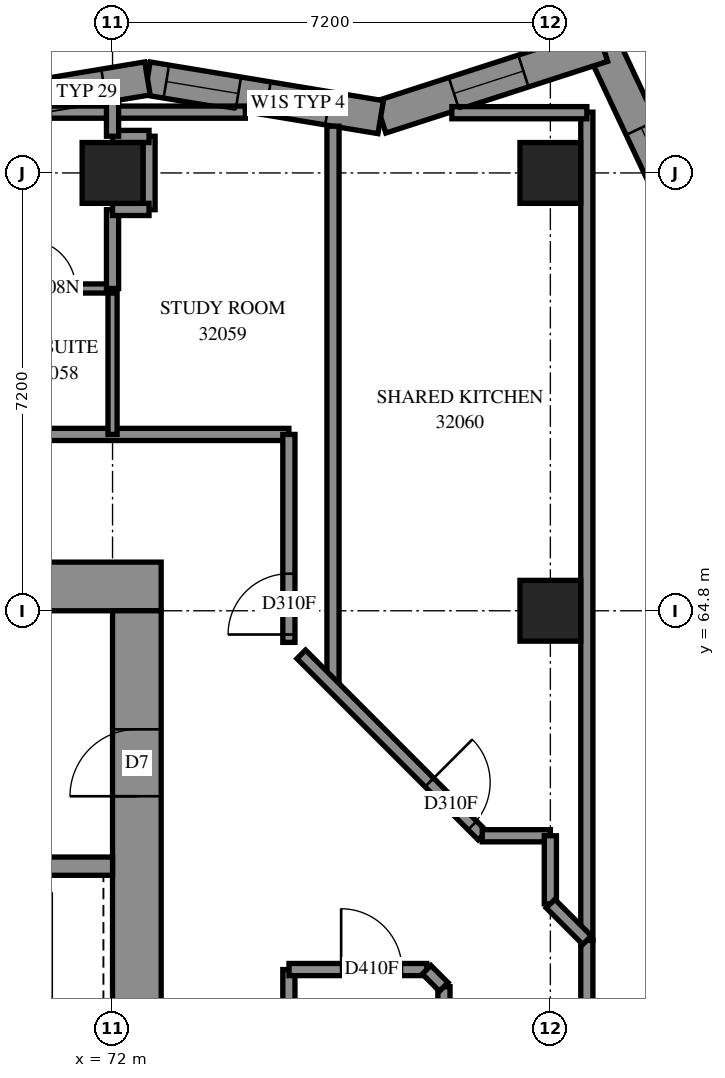
"""IFC4 building model, lengths in metres.
Left out: names, types, materials, properties, quantities, classifications, styles, units other than length and angle.
Written with IfcOpenShell. Run it as: python <this file> out.ifc"""

import sys

from ifc_helpers import new_model, si_unit, direction, frame, frame_2d, origin, origin_2d, place, context, subcontext, project, spatial, polyline, rectangle, outline, extrude, element, fill, save


model = new_model("IFC4")
c1 = context("Model", 3, precision=1e-05, world=origin(), true_north=direction((0.0, 1.0)))
c2 = subcontext(c1, "Body", "Model", "MODEL_VIEW")
j1 = project(units=[si_unit("LENGTHUNIT", "METRE"), si_unit("PLANEANGLEUNIT", "RADIAN")], contexts=[c1])
p1 = place(None, origin())
s1 = spatial("IfcSite", under=j1, at=p1, CompositionType="ELEMENT")
p2 = place(p1, origin())
s2 = spatial("IfcBuilding", under=s1, at=p2, CompositionType="ELEMENT")
p3 = place(p2, frame((0.0, 0.0, 118.6)))
s3 = spatial("IfcBuildingStorey", under=s2, at=p3, CompositionType="ELEMENT", Elevation=118.6)
for number, where, z_axis, x_axis in (
    (1, (72.0, 72.0, 0.0), (0.0, 0.0, 1.0), (1.0, 0.0, 0.0)),
    (2, (79.2, 64.8, 0.0), (0.0, 0.0, 1.0), (1.0, 0.0, 0.0)),
    (3, (79.2, 72.0, 0.0), (0.0, 0.0, 1.0), (1.0, 0.0, 0.0)),
):
    element("IfcColumn", number, at=place(p3, frame(where, z_axis=z_axis, x_axis=x_axis)), inside=s3, PredefinedType="COLUMN", context=c2, shape_type="SweptSolid", body=[
        extrude(rectangle(XDim=1.0, YDim=1.0, at=origin_2d()), origin(), (0.0, 0.0, 1.0), 3.1),
    ])
p4 = place(p3, frame((56.8, 65.2, -0.3), z_axis=(0.0, 0.0, 1.0), x_axis=(1.0, 0.0, 0.0)))
e4 = element("IfcWall", 4, at=p4, inside=s3, PredefinedType="SHEAR", context=c2, shape_type="SweptSolid", body=[
    extrude(rectangle(XDim=16.0, YDim=0.8, at=frame_2d((8.0, 0.0))), origin(), (0.0, 0.0, 1.0), 2.7),
])
p5 = place(p4, frame((10.8, 0.0, 0.3)))
e5 = element("IfcOpeningElement", 5, at=p5, cuts=e4, PredefinedType="OPENING", context=c2, shape_type="SweptSolid", body=[
    extrude(rectangle(XDim=0.8, YDim=2.1, at=frame_2d((0.4, 1.05))), frame((0.0, 0.41, 0.0), z_axis=(0.0, -1.0, 0.0), x_axis=(1.0, 0.0, 0.0)), (0.0, 0.0, 1.0), 0.82),
])
p6 = place(p3, frame((72.4, 50.4, -0.3), z_axis=(0.0, 0.0, 1.0), x_axis=(0.0, 1.0, 0.0)))
e6 = element("IfcWall", 6, at=p6, inside=s3, PredefinedType="SHEAR", context=c2, shape_type="SweptSolid", body=[
    extrude(rectangle(XDim=14.4, YDim=0.8, at=frame_2d((7.2, 0.0))), origin(), (0.0, 0.0, 1.0), 2.7),
])
p7 = place(p6, frame((4.55, 0.0, 0.3)))
e7 = element("IfcOpeningElement", 7, at=p7, cuts=e6, PredefinedType="OPENING", context=c2, shape_type="SweptSolid", body=[
    extrude(rectangle(XDim=1.1, YDim=2.1, at=frame_2d((0.55, 1.05))), frame((0.0, 0.41, 0.0), z_axis=(0.0, -1.0, 0.0), x_axis=(1.0, 0.0, 0.0)), (0.0, 0.0, 1.0), 0.82),
])
p8 = place(p6, frame((11.35, 0.0, 0.3)))
e8 = element("IfcOpeningElement", 8, at=p8, cuts=e6, PredefinedType="OPENING", context=c2, shape_type="SweptSolid", body=[
    extrude(rectangle(XDim=1.1, YDim=2.1, at=frame_2d((0.55, 1.05))), frame((0.0, 0.41, 0.0), z_axis=(0.0, -1.0, 0.0), x_axis=(1.0, 0.0, 0.0)), (0.0, 0.0, 1.0), 0.82),
])
p9 = place(p3, frame((64.8, 60.6, 0.0), z_axis=(0.0, 0.0, 1.0), x_axis=(1.0, 0.0, 0.0)))
e9 = element("IfcWall", 9, at=p9, inside=s3, PredefinedType="SOLIDWALL", context=c2, shape_type="SweptSolid", body=[
    extrude(rectangle(XDim=7.2, YDim=0.3, at=frame_2d((3.6, 0.0))), origin(), (0.0, 0.0, 1.0), 3.1),
])
p10 = place(p3, frame((76.372, 49.373, -0.3), z_axis=(0.0, 0.0, 1.0), x_axis=(0.7071067812, 0.7071067812, 0.0)))
e10 = element("IfcWall", 10, at=p10, inside=s3, PredefinedType="SHEAR", context=c2, shape_type="SweptSolid", body=[
    extrude(rectangle(XDim=14.4, YDim=0.8, at=frame_2d((7.2, 0.0))), origin(), (0.0, 0.0, 1.0), 2.7),
])
p11 = place(p10, frame((4.55, 0.0, 0.3)))
e11 = element("IfcOpeningElement", 11, at=p11, cuts=e10, PredefinedType="OPENING", context=c2, shape_type="SweptSolid", body=[
    extrude(rectangle(XDim=1.1, YDim=2.1, at=frame_2d((0.55, 1.05))), frame((0.0, 0.41, 0.0), z_axis=(0.0, -1.0, 0.0), x_axis=(1.0, 0.0, 0.0)), (0.0, 0.0, 1.0), 0.82),
])
p12 = place(p10, frame((11.35, 0.0, 0.3)))
e12 = element("IfcOpeningElement", 12, at=p12, cuts=e10, PredefinedType="OPENING", context=c2, shape_type="SweptSolid", body=[
    extrude(rectangle(XDim=1.1, YDim=2.1, at=frame_2d((0.55, 1.05))), frame((0.0, 0.41, 0.0), z_axis=(0.0, -1.0, 0.0), x_axis=(1.0, 0.0, 0.0)), (0.0, 0.0, 1.0), 0.82),
])
p13 = place(p3, frame((81.531, 70.964, 0.0), z_axis=(0.0, 0.0, 1.0), x_axis=(-0.425664885, 0.9048808793, 0.0)))
e13 = element("IfcWall", 13, at=p13, inside=s3, PredefinedType="SOLIDWALL", context=c2, shape_type="SweptSolid", body=[
    extrude(outline(polyline([(0.074, -0.275), (3.704, -0.275), (3.22, 0.275), (-0.074, 0.275), (0.074, -0.275)])), origin(), (0.0, 0.0, 1.0), 3.1),
])
p14 = place(p13, frame((0.765, 0.0, 0.5)))
e14 = element("IfcOpeningElement", 14, at=p14, cuts=e13, PredefinedType="OPENING", context=c2, shape_type="SweptSolid", body=[
    extrude(rectangle(XDim=1.2, YDim=2.45, at=frame_2d((0.6, 1.225))), frame((0.0, 0.285, 0.0), z_axis=(0.0, -1.0, 0.0), x_axis=(1.0, 0.0, 0.0)), (0.0, 0.0, 1.0), 0.57),
])
p15 = place(p3, frame((80.058, 74.097, 0.0), z_axis=(0.0, 0.0, 1.0), x_axis=(-0.9515336755, -0.307544573, 0.0)))
e15 = element("IfcWall", 15, at=p15, inside=s3, PredefinedType="SOLIDWALL", context=c2, shape_type="SweptSolid", body=[
    extrude(outline(polyline([(-0.242, -0.275), (3.767, -0.275), (3.901, 0.275), (0.242, 0.275), (-0.242, -0.275)])), origin(), (0.0, 0.0, 1.0), 3.1),
])
p16 = place(p15, frame((1.368, 0.0, 0.5)))
e16 = element("IfcOpeningElement", 16, at=p16, cuts=e15, PredefinedType="OPENING", context=c2, shape_type="SweptSolid", body=[
    extrude(rectangle(XDim=1.2, YDim=2.45, at=frame_2d((0.6, 1.225))), frame((0.0, 0.285, 0.0), z_axis=(0.0, -1.0, 0.0), x_axis=(1.0, 0.0, 0.0)), (0.0, 0.0, 1.0), 0.57),
])
p17 = place(p3, frame((76.41, 72.918, 0.0), z_axis=(0.0, 0.0, 1.0), x_axis=(-0.9865139149, 0.1636774136, 0.0)))
e17 = element("IfcWall", 17, at=p17, inside=s3, PredefinedType="SOLIDWALL", context=c2, shape_type="SweptSolid", body=[
    extrude(outline(polyline([(0.067, -0.275), (3.934, -0.275), (3.843, 0.275), (-0.067, 0.275), (0.067, -0.275)])), origin(), (0.0, 0.0, 1.0), 3.1),
])
p18 = place(p17, frame((0.879, 0.0, 0.45)))
e18 = element("IfcOpeningElement", 18, at=p18, cuts=e17, PredefinedType="OPENING", context=c2, shape_type="SweptSolid", body=[
    extrude(rectangle(XDim=1.0, YDim=2.5, at=frame_2d((0.5, 1.25))), frame((0.0, 0.285, 0.0), z_axis=(0.0, -1.0, 0.0), x_axis=(1.0, 0.0, 0.0)), (0.0, 0.0, 1.0), 0.57),
])
p19 = place(p17, frame((2.374, 0.0, 0.5)))
e19 = element("IfcOpeningElement", 19, at=p19, cuts=e17, PredefinedType="OPENING", context=c2, shape_type="SweptSolid", body=[
    extrude(rectangle(XDim=1.2, YDim=2.45, at=frame_2d((0.6, 1.225))), frame((0.0, 0.285, 0.0), z_axis=(0.0, -1.0, 0.0), x_axis=(1.0, 0.0, 0.0)), (0.0, 0.0, 1.0), 0.57),
])
p20 = place(p3, frame((72.574, 73.554, 0.0), z_axis=(0.0, 0.0, 1.0), x_axis=(-0.9865110911, -0.1636944324, 0.0)))
e20 = element("IfcWall", 20, at=p20, inside=s3, PredefinedType="SOLIDWALL", context=c2, shape_type="SweptSolid", body=[
    extrude(outline(polyline([(-0.046, -0.275), (3.821, -0.275), (3.913, 0.275), (0.046, 0.275), (-0.046, -0.275)])), origin(), (0.0, 0.0, 1.0), 3.1),
])
p21 = place(p20, frame((0.724, 0.0, 0.5)))
e21 = element("IfcOpeningElement", 21, at=p21, cuts=e20, PredefinedType="OPENING", context=c2, shape_type="SweptSolid", body=[
    extrude(rectangle(XDim=1.3, YDim=2.45, at=frame_2d((0.65, 1.225))), frame((0.0, 0.285, 0.0), z_axis=(0.0, -1.0, 0.0), x_axis=(1.0, 0.0, 0.0)), (0.0, 0.0, 1.0), 0.57),
])
p22 = place(p20, frame((2.224, 0.0, 0.5)))
e22 = element("IfcOpeningElement", 22, at=p22, cuts=e20, PredefinedType="OPENING", context=c2, shape_type="SweptSolid", body=[
    extrude(rectangle(XDim=1.3, YDim=2.45, at=frame_2d((0.65, 1.225))), frame((0.0, 0.285, 0.0), z_axis=(0.0, -1.0, 0.0), x_axis=(1.0, 0.0, 0.0)), (0.0, 0.0, 1.0), 0.57),
])
p23 = place(p3, frame((54.7, 67.7, 0.0), z_axis=(0.0, 0.0, 1.0), x_axis=(1.0, 0.0, 0.0)))
e23 = element("IfcWall", 23, at=p23, inside=s3, PredefinedType="PARTITIONING", context=c2, shape_type="SweptSolid", body=[
    extrude(rectangle(XDim=20.2, YDim=0.2, at=frame_2d((10.1, 0.0))), origin(), (0.0, 0.0, 1.0), 3.1),
])
p24 = place(p23, frame((5.2, 0.0, 0.0)))
e24 = element("IfcOpeningElement", 24, at=p24, cuts=e23, PredefinedType="OPENING", context=c2, shape_type="SweptSolid", body=[
    extrude(rectangle(XDim=0.9, YDim=2.1, at=frame_2d((0.45, 1.05))), frame((0.0, 0.11, 0.0), z_axis=(0.0, -1.0, 0.0), x_axis=(1.0, 0.0, 0.0)), (0.0, 0.0, 1.0), 0.22),
])
p25 = place(p23, frame((8.838, 0.0, 0.0)))
e25 = element("IfcOpeningElement", 25, at=p25, cuts=e23, PredefinedType="OPENING", context=c2, shape_type="SweptSolid", body=[
    extrude(rectangle(XDim=1.0, YDim=2.1, at=frame_2d((0.5, 1.05))), frame((0.0, 0.11, 0.0), z_axis=(0.0, -1.0, 0.0), x_axis=(1.0, 0.0, 0.0)), (0.0, 0.0, 1.0), 0.22),
])
p26 = place(p23, frame((14.1, 0.0, 0.0)))
e26 = element("IfcOpeningElement", 26, at=p26, cuts=e23, PredefinedType="OPENING", context=c2, shape_type="SweptSolid", body=[
    extrude(rectangle(XDim=0.9, YDim=2.1, at=frame_2d((0.45, 1.05))), frame((0.0, 0.11, 0.0), z_axis=(0.0, -1.0, 0.0), x_axis=(1.0, 0.0, 0.0)), (0.0, 0.0, 1.0), 0.22),
])
p27 = place(p3, frame((79.8, 59.38, 0.0), z_axis=(0.0, 0.0, 1.0), x_axis=(0.0, 1.0, 0.0)))
e27 = element("IfcWall", 27, at=p27, inside=s3, PredefinedType="PARTITIONING", context=c2, shape_type="SweptSolid", body=[
    extrude(rectangle(XDim=13.62, YDim=0.2, at=frame_2d((6.81, 0.0))), origin(), (0.0, 0.0, 1.0), 3.1),
])
p28 = place(p3, frame((75.625, 63.562, 0.0), z_axis=(0.0, 0.0, 1.0), x_axis=(0.0, 1.0, 0.0)))
e28 = element("IfcWall", 28, at=p28, inside=s3, PredefinedType="PARTITIONING", context=c2, shape_type="SweptSolid", body=[
    extrude(rectangle(XDim=9.208, YDim=0.2, at=frame_2d((4.604, 0.0))), origin(), (0.0, 0.0, 1.0), 3.1),
])
p29 = place(p3, frame((74.9, 53.9, 0.0), z_axis=(0.0, 0.0, 1.0), x_axis=(0.0, 1.0, 0.0)))
e29 = element("IfcWall", 29, at=p29, inside=s3, PredefinedType="PARTITIONING", context=c2, shape_type="SweptSolid", body=[
    extrude(rectangle(XDim=5.0, YDim=0.2, at=frame_2d((2.5, 0.0))), origin(), (0.0, 0.0, 1.0), 3.1),
])
p30 = place(p3, frame((75.103, 64.083, 0.0), z_axis=(0.0, 0.0, 1.0), x_axis=(0.7071067812, -0.7071067812, 0.0)))
e30 = element("IfcWall", 30, at=p30, inside=s3, PredefinedType="PARTITIONING", context=c2, shape_type="SweptSolid", body=[
    extrude(rectangle(XDim=4.214, YDim=0.2, at=frame_2d((2.107, 0.0))), origin(), (0.0, 0.0, 1.0), 3.1),
])
p31 = place(p30, frame((2.979, 0.0, 0.0)))
e31 = element("IfcOpeningElement", 31, at=p31, cuts=e30, PredefinedType="OPENING", context=c2, shape_type="SweptSolid", body=[
    extrude(rectangle(XDim=1.0, YDim=2.1, at=frame_2d((0.5, 1.05))), frame((0.0, 0.11, 0.0), z_axis=(0.0, -1.0, 0.0), x_axis=(1.0, 0.0, 0.0)), (0.0, 0.0, 1.0), 0.22),
])
p32 = place(p3, frame((74.9, 64.28, 0.0), z_axis=(0.0, 0.0, 1.0), x_axis=(0.0, 1.0, 0.0)))
e32 = element("IfcWall", 32, at=p32, inside=s3, PredefinedType="PARTITIONING", context=c2, shape_type="SweptSolid", body=[
    extrude(rectangle(XDim=3.42, YDim=0.2, at=frame_2d((1.71, 0.0))), origin(), (0.0, 0.0, 1.0), 3.1),
])
p33 = place(p32, frame((0.13, 0.0, 0.0)))
e33 = element("IfcOpeningElement", 33, at=p33, cuts=e32, PredefinedType="OPENING", context=c2, shape_type="SweptSolid", body=[
    extrude(rectangle(XDim=1.0, YDim=2.1, at=frame_2d((0.5, 1.05))), frame((0.0, 0.11, 0.0), z_axis=(0.0, -1.0, 0.0), x_axis=(1.0, 0.0, 0.0)), (0.0, 0.0, 1.0), 0.22),
])
p34 = place(p3, frame((70.964, 73.0, 0.0), z_axis=(0.0, 0.0, 1.0), x_axis=(1.0, 0.0, 0.0)))
e34 = element("IfcWall", 34, at=p34, inside=s3, PredefinedType="PARTITIONING", context=c2, shape_type="SweptSolid", body=[
    extrude(rectangle(XDim=3.22, YDim=0.2, at=frame_2d((1.61, 0.0))), origin(), (0.0, 0.0, 1.0), 3.1),
])
p35 = place(p3, frame((77.45, 55.852, 0.0), z_axis=(0.0, 0.0, 1.0), x_axis=(0.0, 1.0, 0.0)))
e35 = element("IfcWall", 35, at=p35, inside=s3, PredefinedType="PARTITIONING", context=c2, shape_type="SweptSolid", body=[
    extrude(rectangle(XDim=2.766, YDim=0.2, at=frame_2d((1.383, 0.0))), origin(), (0.0, 0.0, 1.0), 3.1),
])
p36 = place(p3, frame((79.8, 56.622, 0.0), z_axis=(0.0, 0.0, 1.0), x_axis=(0.0, 1.0, 0.0)))
e36 = element("IfcWall", 36, at=p36, inside=s3, PredefinedType="PARTITIONING", context=c2, shape_type="SweptSolid", body=[
    extrude(rectangle(XDim=2.758, YDim=0.2, at=frame_2d((1.379, 0.0))), origin(), (0.0, 0.0, 1.0), 3.1),
])
p37 = place(p3, frame((72.0, 67.7, 0.0), z_axis=(0.0, 0.0, 1.0), x_axis=(0.0, 1.0, 0.0)))
e37 = element("IfcWall", 37, at=p37, inside=s3, PredefinedType="PARTITIONING", context=c2, shape_type="SweptSolid", body=[
    extrude(rectangle(XDim=2.4, YDim=0.15, at=frame_2d((1.2, 0.0))), origin(), (0.0, 0.0, 1.0), 3.1),
])
p38 = place(p3, frame((74.902, 58.9, 0.0), z_axis=(0.0, 0.0, 1.0), x_axis=(1.0, 0.0, 0.0)))
e38 = element("IfcWall", 38, at=p38, inside=s3, PredefinedType="PARTITIONING", context=c2, shape_type="SweptSolid", body=[
    extrude(rectangle(XDim=2.266, YDim=0.2, at=frame_2d((1.133, 0.0))), origin(), (0.0, 0.0, 1.0), 3.1),
])
p39 = place(p38, frame((0.858, 0.0, 0.0)))
e39 = element("IfcOpeningElement", 39, at=p39, cuts=e38, PredefinedType="OPENING", context=c2, shape_type="SweptSolid", body=[
    extrude(rectangle(XDim=1.0, YDim=2.1, at=frame_2d((0.5, 1.05))), frame((0.0, 0.11, 0.0), z_axis=(0.0, -1.0, 0.0), x_axis=(1.0, 0.0, 0.0)), (0.0, 0.0, 1.0), 0.22),
])
p40 = place(p3, frame((77.58, 72.991, 0.0), z_axis=(0.0, 0.0, 1.0), x_axis=(1.0, 0.0, 0.0)))
e40 = element("IfcWall", 40, at=p40, inside=s3, PredefinedType="PARTITIONING", context=c2, shape_type="SweptSolid", body=[
    extrude(rectangle(XDim=2.22, YDim=0.2, at=frame_2d((1.11, 0.0))), origin(), (0.0, 0.0, 1.0), 3.1),
])
p41 = place(p3, frame((70.1, 70.1, 0.0), z_axis=(0.0, 0.0, 1.0), x_axis=(1.0, 0.0, 0.0)))
e41 = element("IfcWall", 41, at=p41, inside=s3, PredefinedType="PARTITIONING", context=c2, shape_type="SweptSolid", body=[
    extrude(rectangle(XDim=1.9, YDim=0.15, at=frame_2d((0.95, 0.0))), origin(), (0.0, 0.0, 1.0), 3.1),
])
p42 = place(p41, frame((0.493, 0.0, 0.0)))
e42 = element("IfcOpeningElement", 42, at=p42, cuts=e41, PredefinedType="OPENING", context=c2, shape_type="SweptSolid", body=[
    extrude(rectangle(XDim=0.8, YDim=2.1, at=frame_2d((0.4, 1.05))), frame((0.0, 0.085, 0.0), z_axis=(0.0, -1.0, 0.0), x_axis=(1.0, 0.0, 0.0)), (0.0, 0.0, 1.0), 0.17),
])
p43 = place(p3, frame((72.0, 70.1, 0.0), z_axis=(0.0, 0.0, 1.0), x_axis=(0.0, 1.0, 0.0)))
e43 = element("IfcWall", 43, at=p43, inside=s3, PredefinedType="PARTITIONING", context=c2, shape_type="SweptSolid", body=[
    extrude(rectangle(XDim=1.296, YDim=0.2, at=frame_2d((0.648, 0.0))), origin(), (0.0, 0.0, 1.0), 3.1),
])
p44 = place(p3, frame((72.6, 71.396, 0.0), z_axis=(0.0, 0.0, 1.0), x_axis=(0.0, 1.0, 0.0)))
e44 = element("IfcWall", 44, at=p44, inside=s3, PredefinedType="PARTITIONING", context=c2, shape_type="SweptSolid", body=[
    extrude(rectangle(XDim=1.208, YDim=0.2, at=frame_2d((0.604, 0.0))), origin(), (0.0, 0.0, 1.0), 3.1),
])
for number, where, z_axis, x_axis in (
    (45, (78.08, 61.1, 0.0), (0.0, 0.0, 1.0), (1.0, 0.0, 0.0)),
    (46, (79.2, 59.98, 0.0), (0.0, 0.0, 1.0), (0.0, 1.0, 0.0)),
):
    element("IfcWall", number, at=place(p3, frame(where, z_axis=z_axis, x_axis=x_axis)), inside=s3, PredefinedType="PARTITIONING", context=c2, shape_type="SweptSolid", body=[
        extrude(rectangle(XDim=1.12, YDim=0.2, at=frame_2d((0.56, 0.0))), origin(), (0.0, 0.0, 1.0), 3.1),
    ])
p45 = place(p3, frame((79.203, 59.983, 0.0), z_axis=(0.0, 0.0, 1.0), x_axis=(0.7071067812, -0.7071067812, 0.0)))
e47 = element("IfcWall", 47, at=p45, inside=s3, PredefinedType="PARTITIONING", context=c2, shape_type="SweptSolid", body=[
    extrude(rectangle(XDim=0.849, YDim=0.2, at=frame_2d((0.424, 0.0))), origin(), (0.0, 0.0, 1.0), 3.1),
])
for number, where, z_axis, x_axis in (
    (48, (72.0, 72.6, 0.0), (0.0, 0.0, 1.0), (1.0, 0.0, 0.0)),
    (49, (72.0, 71.4, 0.0), (0.0, 0.0, 1.0), (1.0, 0.0, 0.0)),
):
    element("IfcWall", number, at=place(p3, frame(where, z_axis=z_axis, x_axis=x_axis)), inside=s3, PredefinedType="PARTITIONING", context=c2, shape_type="SweptSolid", body=[
        extrude(rectangle(XDim=0.6, YDim=0.2, at=frame_2d((0.3, 0.0))), origin(), (0.0, 0.0, 1.0), 3.1),
    ])
p46 = place(p3, frame((77.165, 58.897, 0.0), z_axis=(0.0, 0.0, 1.0), x_axis=(0.7071067812, -0.7071067812, 0.0)))
e50 = element("IfcWall", 50, at=p46, inside=s3, PredefinedType="PARTITIONING", context=c2, shape_type="SweptSolid", body=[
    extrude(rectangle(XDim=0.399, YDim=0.2, at=frame_2d((0.199, 0.0))), origin(), (0.0, 0.0, 1.0), 3.1),
])
p47 = place(p3, frame((72.0, 72.604, 0.0), z_axis=(0.0, 0.0, 1.0), x_axis=(0.0, 1.0, 0.0)))
e51 = element("IfcWall", 51, at=p47, inside=s3, PredefinedType="PARTITIONING", context=c2, shape_type="SweptSolid", body=[
    extrude(rectangle(XDim=0.576, YDim=0.2, at=frame_2d((0.288, 0.0))), origin(), (0.0, 0.0, 1.0), 3.1),
])
p48 = place(p14, origin())
e52 = element("IfcWindow", 52, at=p48, inside=s3, PartitioningType="SINGLE_PANEL", PredefinedType="WINDOW", context=c2, shape_type="SweptSolid", body=[
    extrude(rectangle(XDim=1.2, YDim=2.45, at=frame_2d((0.6, 1.225))), frame((0.0, 0.155, 0.0), z_axis=(0.0, -1.0, 0.0), x_axis=(1.0, 0.0, 0.0)), (0.0, 0.0, 1.0), 0.06),
])
fill(e14, e52)
p49 = place(p16, origin())
e53 = element("IfcWindow", 53, at=p49, inside=s3, PartitioningType="SINGLE_PANEL", PredefinedType="WINDOW", context=c2, shape_type="SweptSolid", body=[
    extrude(rectangle(XDim=1.2, YDim=2.45, at=frame_2d((0.6, 1.225))), frame((0.0, 0.155, 0.0), z_axis=(0.0, -1.0, 0.0), x_axis=(1.0, 0.0, 0.0)), (0.0, 0.0, 1.0), 0.06),
])
fill(e16, e53)
p50 = place(p21, origin())
e54 = element("IfcWindow", 54, at=p50, inside=s3, PartitioningType="SINGLE_PANEL", PredefinedType="WINDOW", context=c2, shape_type="SweptSolid", body=[
    extrude(rectangle(XDim=1.3, YDim=2.45, at=frame_2d((0.65, 1.225))), frame((0.0, 0.155, 0.0), z_axis=(0.0, -1.0, 0.0), x_axis=(1.0, 0.0, 0.0)), (0.0, 0.0, 1.0), 0.06),
])
fill(e21, e54)
p51 = place(p8, origin())
e55 = element("IfcDoor", 55, at=p51, inside=s3, OperationType="SINGLE_SWING_RIGHT", PredefinedType="DOOR", context=c2, shape_type="SweptSolid", body=[
    extrude(rectangle(XDim=1.1, YDim=2.1, at=frame_2d((0.55, 1.05))), frame((0.0, 0.025, 0.0), z_axis=(0.0, -1.0, 0.0), x_axis=(1.0, 0.0, 0.0)), (0.0, 0.0, 1.0), 0.05),
])
fill(e8, e55)
p52 = place(p39, origin())
e56 = element("IfcDoor", 56, at=p52, inside=s3, OperationType="SINGLE_SWING_RIGHT", PredefinedType="DOOR", context=c2, shape_type="SweptSolid", body=[
    extrude(rectangle(XDim=1.0, YDim=2.1, at=frame_2d((0.5, 1.05))), frame((0.0, 0.025, 0.0), z_axis=(0.0, -1.0, 0.0), x_axis=(1.0, 0.0, 0.0)), (0.0, 0.0, 1.0), 0.05),
])
fill(e39, e56)
p53 = place(p42, origin())
e57 = element("IfcDoor", 57, at=p53, inside=s3, OperationType="SINGLE_SWING_RIGHT", PredefinedType="DOOR", context=c2, shape_type="SweptSolid", body=[
    extrude(rectangle(XDim=0.8, YDim=2.1, at=frame_2d((0.4, 1.05))), frame((0.0, 0.025, 0.0), z_axis=(0.0, -1.0, 0.0), x_axis=(1.0, 0.0, 0.0)), (0.0, 0.0, 1.0), 0.05),
])
fill(e42, e57)
p54 = place(p33, origin())
e58 = element("IfcDoor", 58, at=p54, inside=s3, OperationType="SINGLE_SWING_RIGHT", PredefinedType="DOOR", context=c2, shape_type="SweptSolid", body=[
    extrude(rectangle(XDim=1.0, YDim=2.1, at=frame_2d((0.5, 1.05))), frame((0.0, 0.025, 0.0), z_axis=(0.0, -1.0, 0.0), x_axis=(1.0, 0.0, 0.0)), (0.0, 0.0, 1.0), 0.05),
])
fill(e33, e58)
p55 = place(p31, origin())
e59 = element("IfcDoor", 59, at=p55, inside=s3, OperationType="SINGLE_SWING_LEFT", PredefinedType="DOOR", context=c2, shape_type="SweptSolid", body=[
    extrude(rectangle(XDim=1.0, YDim=2.1, at=frame_2d((0.5, 1.05))), frame((0.0, 0.025, 0.0), z_axis=(0.0, -1.0, 0.0), x_axis=(1.0, 0.0, 0.0)), (0.0, 0.0, 1.0), 0.05),
])
fill(e31, e59)
p56 = place(p18, origin())
e60 = element("IfcWindow", 60, at=p56, inside=s3, PartitioningType="SINGLE_PANEL", PredefinedType="WINDOW", context=c2, shape_type="SweptSolid", body=[
    extrude(rectangle(XDim=1.0, YDim=2.5, at=frame_2d((0.5, 1.25))), frame((0.0, 0.155, 0.0), z_axis=(0.0, -1.0, 0.0), x_axis=(1.0, 0.0, 0.0)), (0.0, 0.0, 1.0), 0.06),
])
fill(e18, e60)
p57 = place(p19, origin())
e61 = element("IfcWindow", 61, at=p57, inside=s3, PartitioningType="SINGLE_PANEL", PredefinedType="WINDOW", context=c2, shape_type="SweptSolid", body=[
    extrude(rectangle(XDim=1.2, YDim=2.45, at=frame_2d((0.6, 1.225))), frame((0.0, 0.155, 0.0), z_axis=(0.0, -1.0, 0.0), x_axis=(1.0, 0.0, 0.0)), (0.0, 0.0, 1.0), 0.06),
])
fill(e19, e61)
save(model, sys.argv[1])
